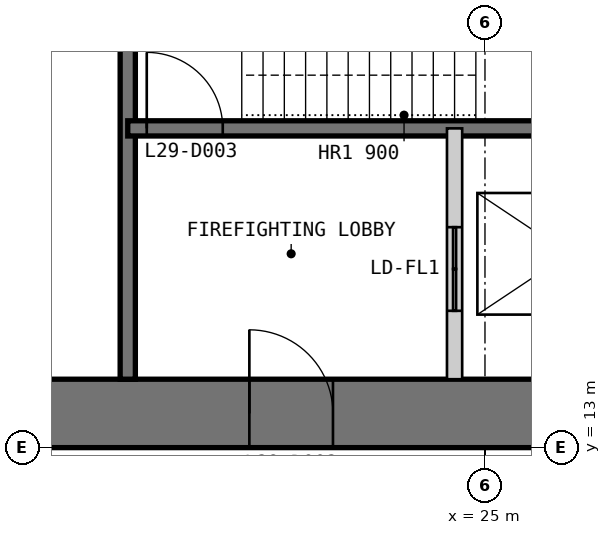
"""IFC4 building model, lengths in metres.
Left out: names, types, materials, properties, quantities, classifications, styles, units other than length and angle.
Written with IfcOpenShell. Run it as: python <this file> out.ifc"""

import sys

from ifc_helpers import new_model, si_unit, direction, frame, frame_2d, origin, place, context, subcontext, project, spatial, polyline, rectangle, outline, extrude, element, fill, save


model = new_model("IFC4")
c1 = context("Model", 3, precision=1e-05, world=origin(), true_north=direction((0.0, 1.0)))
c2 = subcontext(c1, "Body", "Model", "MODEL_VIEW")
j1 = project(units=[si_unit("LENGTHUNIT", "METRE"), si_unit("PLANEANGLEUNIT", "RADIAN")], contexts=[c1])
p1 = place(None, origin())
s1 = spatial("IfcSite", under=j1, at=p1, CompositionType="ELEMENT")
p2 = place(p1, origin())
s2 = spatial("IfcBuilding", under=s1, at=p2, CompositionType="ELEMENT")
p3 = place(p2, frame((0.0, 0.0, 126.4)))
s3 = spatial("IfcBuildingStorey", under=s2, at=p3, CompositionType="ELEMENT", Elevation=126.4)
p4 = place(p3, frame((13.0, 13.45, 0.0), z_axis=(0.0, 0.0, 1.0), x_axis=(1.0, 0.0, 0.0)))
e1 = element("IfcWall", 1, at=p4, inside=s3, PredefinedType="SHEAR", context=c2, shape_type="SweptSolid", body=[
    extrude(outline(polyline([(0.0, -0.45), (24.0, -0.45), (23.1, 0.45), (0.9, 0.45), (0.0, -0.45)])), origin(), (0.0, 0.0, 1.0), 4.0),
])
p5 = place(p4, frame((4.9, 0.0, 0.0)))
e2 = element("IfcOpeningElement", 2, at=p5, cuts=e1, PredefinedType="OPENING", context=c2, shape_type="SweptSolid", body=[
    extrude(rectangle(XDim=1.0, YDim=2.2, at=frame_2d((0.5, 1.1))), frame((0.0, 0.46, 0.0), z_axis=(0.0, -1.0, 0.0), x_axis=(1.0, 0.0, 0.0)), (0.0, 0.0, 1.0), 0.92),
])
p6 = place(p4, frame((8.9, 0.0, 0.0)))
e3 = element("IfcOpeningElement", 3, at=p6, cuts=e1, PredefinedType="OPENING", context=c2, shape_type="SweptSolid", body=[
    extrude(rectangle(XDim=1.1, YDim=2.2, at=frame_2d((0.55, 1.1))), frame((0.0, 0.46, 0.0), z_axis=(0.0, -1.0, 0.0), x_axis=(1.0, 0.0, 0.0)), (0.0, 0.0, 1.0), 0.92),
])
p7 = place(p4, frame((15.05, 0.0, 0.0)))
e4 = element("IfcOpeningElement", 4, at=p7, cuts=e1, PredefinedType="OPENING", context=c2, shape_type="SweptSolid", body=[
    extrude(rectangle(XDim=0.9, YDim=2.2, at=frame_2d((0.45, 1.1))), frame((0.0, 0.46, 0.0), z_axis=(0.0, -1.0, 0.0), x_axis=(1.0, 0.0, 0.0)), (0.0, 0.0, 1.0), 0.92),
])
p8 = place(p4, frame((17.9, 0.0, 0.0)))
e5 = element("IfcOpeningElement", 5, at=p8, cuts=e1, PredefinedType="OPENING", context=c2, shape_type="SweptSolid", body=[
    extrude(rectangle(XDim=1.0, YDim=2.2, at=frame_2d((0.5, 1.1))), frame((0.0, 0.46, 0.0), z_axis=(0.0, -1.0, 0.0), x_axis=(1.0, 0.0, 0.0)), (0.0, 0.0, 1.0), 0.92),
])
p9 = place(p4, frame((21.4, 0.0, 0.0)))
e6 = element("IfcOpeningElement", 6, at=p9, cuts=e1, PredefinedType="OPENING", context=c2, shape_type="SweptSolid", body=[
    extrude(rectangle(XDim=1.0, YDim=2.2, at=frame_2d((0.5, 1.1))), frame((0.0, 0.46, 0.0), z_axis=(0.0, -1.0, 0.0), x_axis=(1.0, 0.0, 0.0)), (0.0, 0.0, 1.0), 0.92),
])
p10 = place(p3, frame((20.3, 13.9, 0.0), z_axis=(0.0, 0.0, 1.0), x_axis=(0.0, 1.0, 0.0)))
e7 = element("IfcWall", 7, at=p10, inside=s3, PredefinedType="SOLIDWALL", context=c2, shape_type="SweptSolid", body=[
    extrude(rectangle(XDim=16.1, YDim=0.2, at=frame_2d((8.05, 0.0))), origin(), (0.0, 0.0, 1.0), 3.8),
])
p11 = place(p10, frame((7.217, 0.0, 0.0)))
e8 = element("IfcOpeningElement", 8, at=p11, cuts=e7, PredefinedType="OPENING", context=c2, shape_type="SweptSolid", body=[
    extrude(rectangle(XDim=1.1, YDim=2.2, at=frame_2d((0.55, 1.1))), frame((0.0, 0.11, 0.0), z_axis=(0.0, -1.0, 0.0), x_axis=(1.0, 0.0, 0.0)), (0.0, 0.0, 1.0), 0.22),
])
p12 = place(p10, frame((10.55, 0.0, 0.0)))
e9 = element("IfcOpeningElement", 9, at=p12, cuts=e7, PredefinedType="OPENING", context=c2, shape_type="SweptSolid", body=[
    extrude(rectangle(XDim=1.1, YDim=2.2, at=frame_2d((0.55, 1.1))), frame((0.0, 0.11, 0.0), z_axis=(0.0, -1.0, 0.0), x_axis=(1.0, 0.0, 0.0)), (0.0, 0.0, 1.0), 0.22),
])
p13 = place(p10, frame((13.883, 0.0, 0.0)))
e10 = element("IfcOpeningElement", 10, at=p13, cuts=e7, PredefinedType="OPENING", context=c2, shape_type="SweptSolid", body=[
    extrude(rectangle(XDim=1.1, YDim=2.2, at=frame_2d((0.55, 1.1))), frame((0.0, 0.11, 0.0), z_axis=(0.0, -1.0, 0.0), x_axis=(1.0, 0.0, 0.0)), (0.0, 0.0, 1.0), 0.22),
])
p14 = place(p3, frame((20.3, 17.2, 0.0), z_axis=(0.0, 0.0, 1.0), x_axis=(1.0, 0.0, 0.0)))
e11 = element("IfcWall", 11, at=p14, inside=s3, PredefinedType="SOLIDWALL", context=c2, shape_type="SweptSolid", body=[
    extrude(rectangle(XDim=9.4, YDim=0.2, at=frame_2d((4.7, 0.0))), origin(), (0.0, 0.0, 1.0), 3.8),
])
p15 = place(p14, frame((0.25, 0.0, 0.0)))
e12 = element("IfcOpeningElement", 12, at=p15, cuts=e11, PredefinedType="OPENING", context=c2, shape_type="SweptSolid", body=[
    extrude(rectangle(XDim=1.0, YDim=2.2, at=frame_2d((0.5, 1.1))), frame((0.0, 0.11, 0.0), z_axis=(0.0, -1.0, 0.0), x_axis=(1.0, 0.0, 0.0)), (0.0, 0.0, 1.0), 0.22),
])
p16 = place(p3, frame((24.6, 13.9, 0.0), z_axis=(0.0, 0.0, 1.0), x_axis=(0.0, 1.0, 0.0)))
e13 = element("IfcWall", 13, at=p16, inside=s3, PredefinedType="PARTITIONING", context=c2, shape_type="SweptSolid", body=[
    extrude(rectangle(XDim=3.3, YDim=0.2, at=frame_2d((1.65, 0.0))), origin(), (0.0, 0.0, 1.0), 3.8),
])
p17 = place(p16, frame((0.9, 0.0, 0.0)))
e14 = element("IfcOpeningElement", 14, at=p17, cuts=e13, PredefinedType="OPENING", context=c2, shape_type="SweptSolid", body=[
    extrude(rectangle(XDim=1.1, YDim=2.2, at=frame_2d((0.55, 1.1))), frame((0.0, 0.11, 0.0), z_axis=(0.0, -1.0, 0.0), x_axis=(1.0, 0.0, 0.0)), (0.0, 0.0, 1.0), 0.22),
])
p18 = place(p6, origin())
e15 = element("IfcDoor", 15, at=p18, inside=s3, OperationType="SINGLE_SWING_LEFT", PredefinedType="DOOR", context=c2, shape_type="SweptSolid", body=[
    extrude(rectangle(XDim=1.1, YDim=2.2, at=frame_2d((0.55, 1.1))), frame((0.0, 0.025, 0.0), z_axis=(0.0, -1.0, 0.0), x_axis=(1.0, 0.0, 0.0)), (0.0, 0.0, 1.0), 0.05),
    extrude(outline(polyline([(0.0, 0.0), (0.04, 0.0), (0.04, 2.16), (1.06, 2.16), (1.06, 0.0), (1.1, 0.0), (1.1, 2.2), (0.0, 2.2), (0.0, 0.0)])), frame((0.0, 0.3, 0.0), z_axis=(0.0, -1.0, 0.0), x_axis=(1.0, 0.0, 0.0)), (0.0, 0.0, 1.0), 0.6),
])
fill(e3, e15)
p19 = place(p15, origin())
e16 = element("IfcDoor", 16, at=p19, inside=s3, OperationType="SINGLE_SWING_LEFT", PredefinedType="DOOR", context=c2, shape_type="SweptSolid", body=[
    extrude(rectangle(XDim=1.0, YDim=2.2, at=frame_2d((0.5, 1.1))), frame((0.0, 0.025, 0.0), z_axis=(0.0, -1.0, 0.0), x_axis=(1.0, 0.0, 0.0)), (0.0, 0.0, 1.0), 0.05),
])
fill(e12, e16)
p20 = place(p17, origin())
e17 = element("IfcDoor", 17, at=p20, inside=s3, OperationType="DOUBLE_DOOR_SLIDING", PredefinedType="DOOR", context=c2, shape_type="SweptSolid", body=[
    extrude(rectangle(XDim=1.1, YDim=2.2, at=frame_2d((0.55, 1.1))), frame((0.0, 0.025, 0.0), z_axis=(0.0, -1.0, 0.0), x_axis=(1.0, 0.0, 0.0)), (0.0, 0.0, 1.0), 0.05),
])
fill(e14, e17)
save(model, sys.argv[1])
